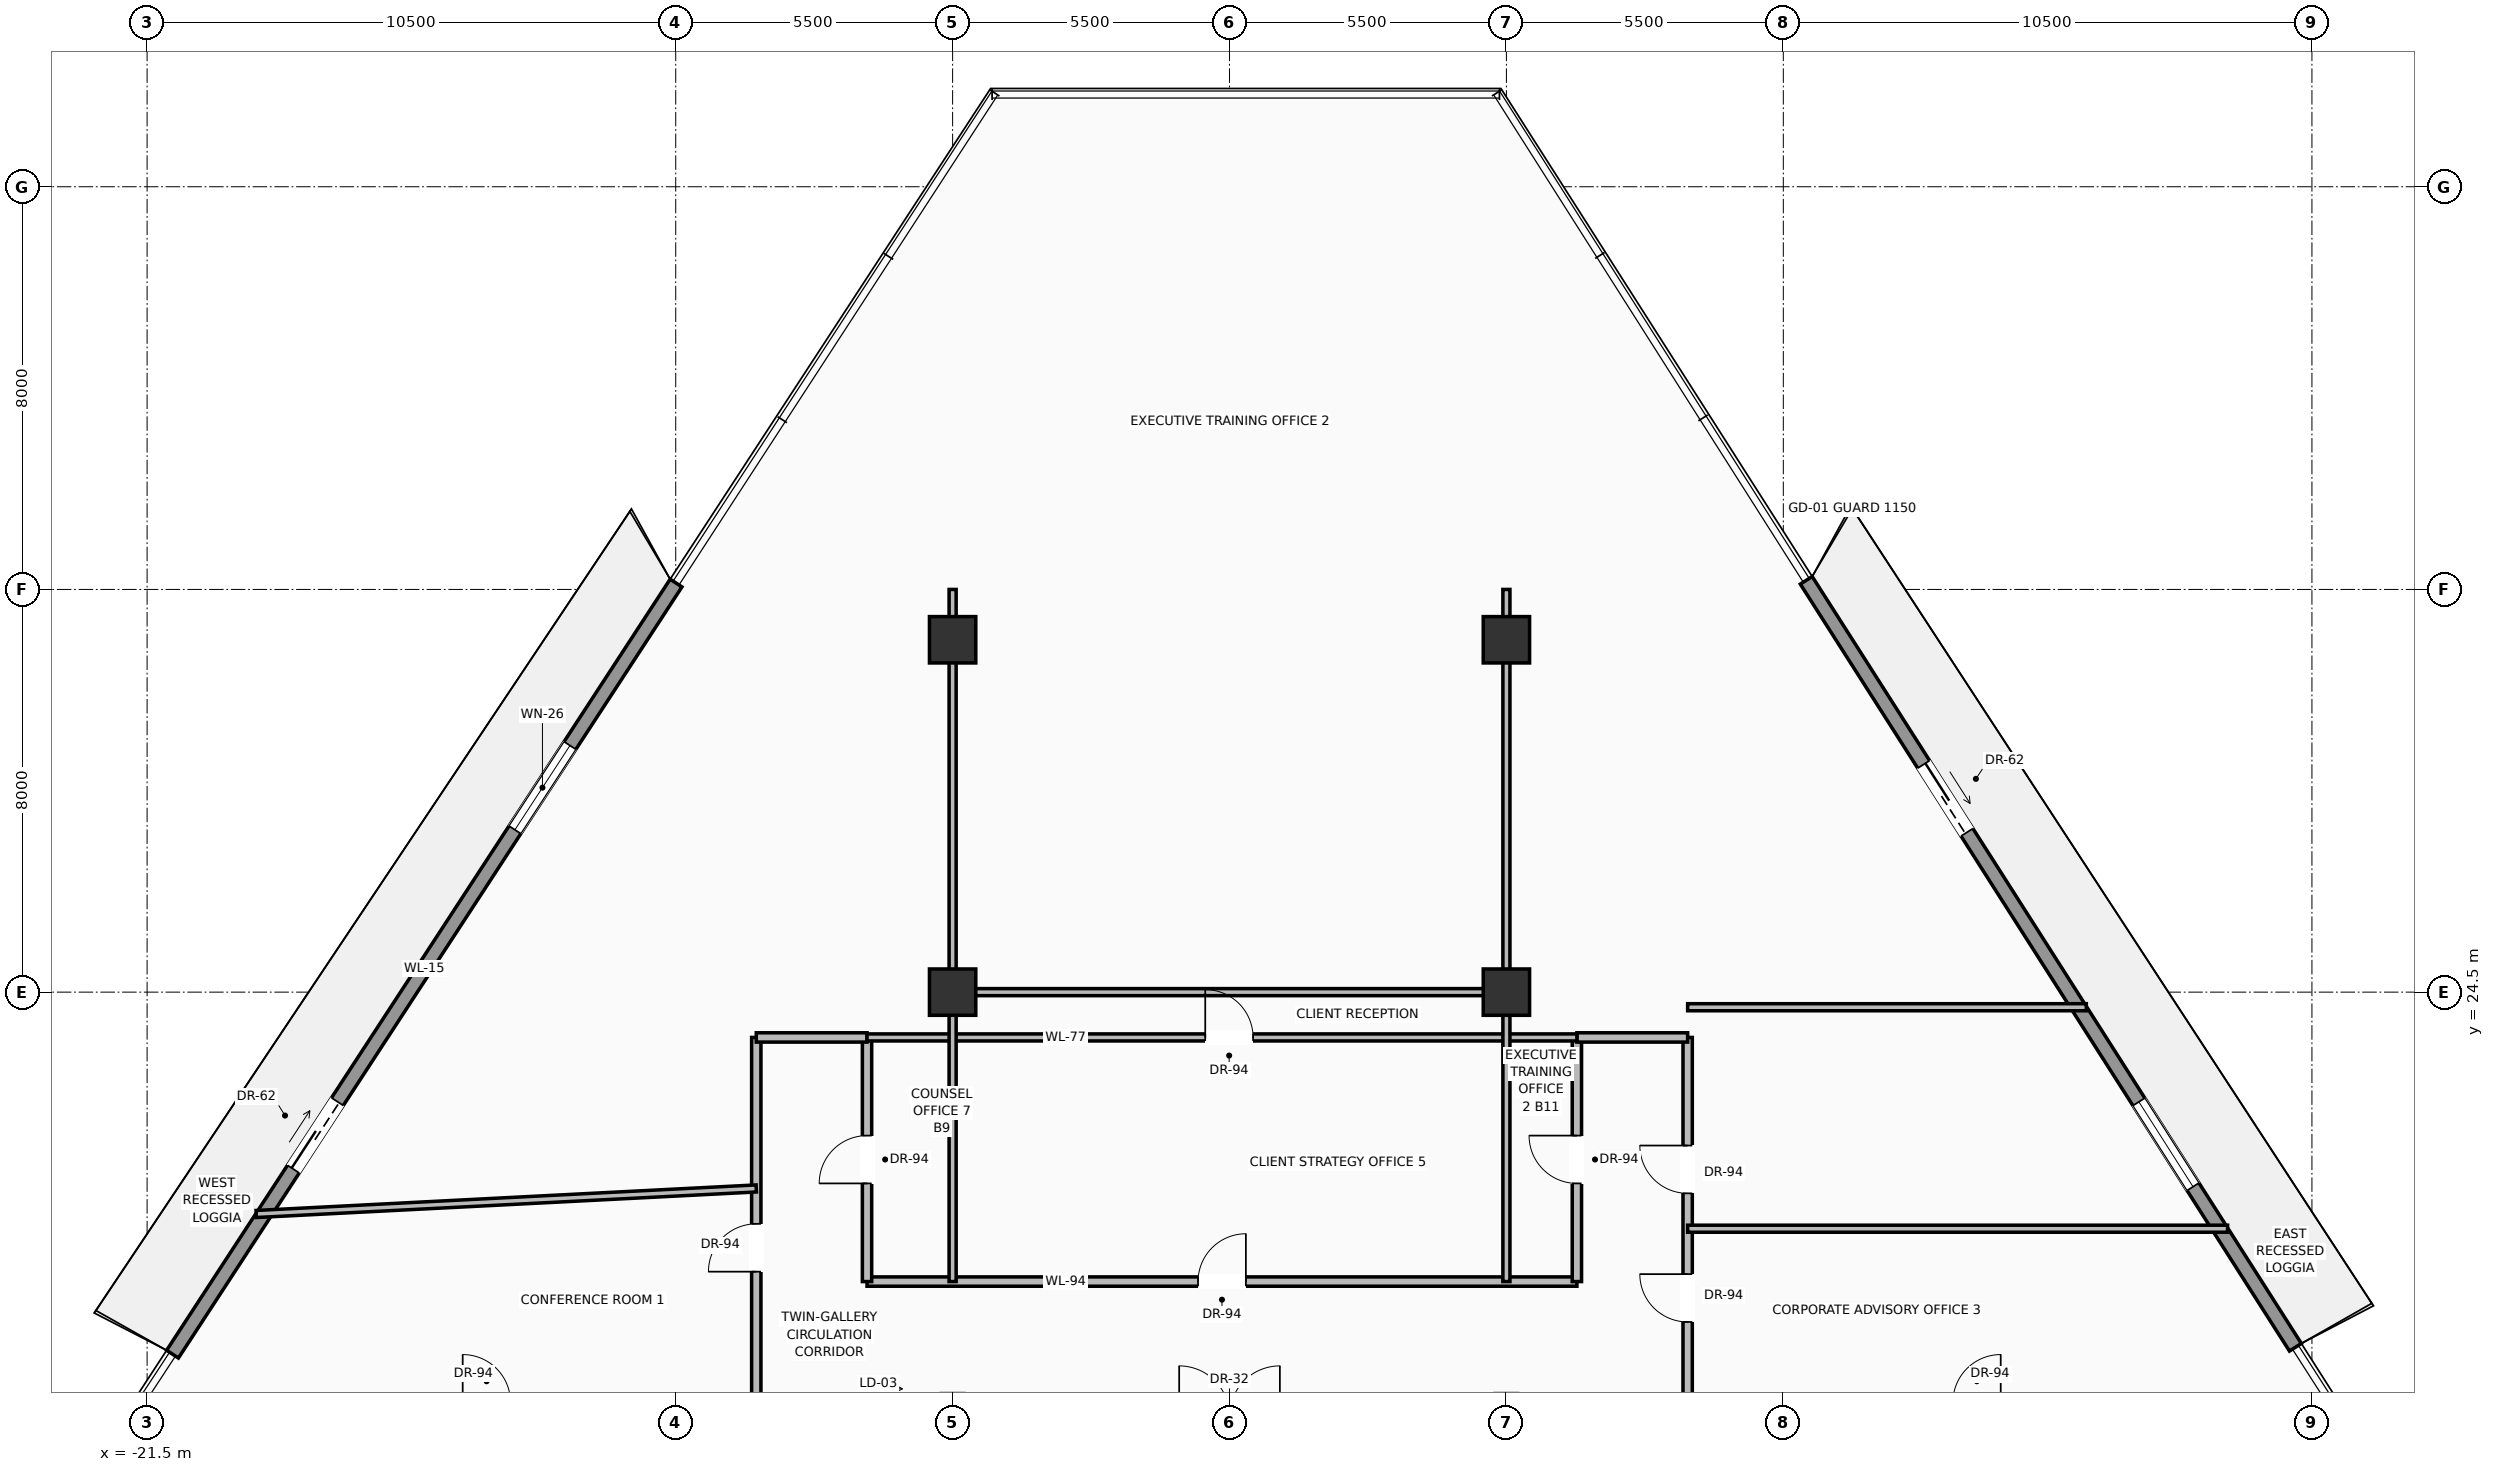
"""IFC4 building model, lengths in metres.
Left out: names, types, materials, properties, quantities, classifications, styles, units other than length and angle.
Written with IfcOpenShell. Run it as: python <this file> out.ifc"""

import sys

from ifc_helpers import new_model, si_unit, direction, frame, frame_2d, origin, origin_2d, place, context, subcontext, project, spatial, rectangle, extrude, source, transform, mapped, element, fill, save


model = new_model("IFC4")
c1 = context("Model", 3, precision=1e-05, world=origin(), true_north=direction((0.0, 1.0)))
c2 = subcontext(c1, "Body", "Model", "MODEL_VIEW")
j1 = project(units=[si_unit("LENGTHUNIT", "METRE"), si_unit("PLANEANGLEUNIT", "RADIAN")], contexts=[c1])
p1 = place(None, origin())
s1 = spatial("IfcSite", under=j1, at=p1, CompositionType="ELEMENT")
p2 = place(p1, origin())
s2 = spatial("IfcBuilding", under=s1, at=p2, CompositionType="ELEMENT")
p3 = place(p2, frame((0.0, 0.0, 136.7)))
s3 = spatial("IfcBuildingStorey", under=s2, at=p3, CompositionType="ELEMENT", Elevation=136.7)
m1 = source(origin(), c2, "Body", "SweptSolid", [
    extrude(rectangle(XDim=0.92, YDim=0.92, at=origin_2d()), origin(), (0.0, 0.0, 1.0), 3.7),
])
for number, where, z_axis, x_axis in (
    (1, (-5.5, 24.5, 0.0), (0.0, 0.0, 1.0), (1.0, 0.0, 0.0)),
    (2, (5.5, 24.5, 0.0), (0.0, 0.0, 1.0), (1.0, 0.0, 0.0)),
    (3, (-5.5, 31.5, 0.0), (0.0, 0.0, 1.0), (1.0, 0.0, 0.0)),
    (4, (5.5, 31.5, 0.0), (0.0, 0.0, 1.0), (1.0, 0.0, 0.0)),
):
    element("IfcColumn", number, at=place(p3, frame(where, z_axis=z_axis, x_axis=x_axis)), inside=s3, PredefinedType="COLUMN", context=c2, shape_type="MappedRepresentation", body=[
        mapped(m1, transform((0.0, 0.0, 0.0), scale=1.0)),
    ])
p4 = place(p3, frame((-20.995, 17.308, 0.0), z_axis=(0.0, 0.0, 1.0), x_axis=(0.546683321298, 0.837339445037, 0.0)))
e5 = element("IfcWall", 5, at=p4, inside=s3, PredefinedType="SOLIDWALL", context=c2, shape_type="SweptSolid", body=[
    extrude(rectangle(XDim=18.295, YDim=0.28, at=frame_2d((9.147, 0.0))), origin(), (0.0, 0.0, 1.0), 3.05),
])
p5 = place(p4, frame((4.391, 0.0, 0.0)))
e6 = element("IfcOpeningElement", 6, at=p5, cuts=e5, PredefinedType="OPENING", context=c2, shape_type="SweptSolid", body=[
    extrude(rectangle(XDim=1.6, YDim=2.35, at=frame_2d((0.8, 1.175))), frame((0.0, 0.15, 0.0), z_axis=(0.0, -1.0, 0.0), x_axis=(1.0, 0.0, 0.0)), (0.0, 0.0, 1.0), 0.3),
])
p6 = place(p4, frame((12.441, 0.0, 0.9)))
e7 = element("IfcOpeningElement", 7, at=p6, cuts=e5, PredefinedType="OPENING", context=c2, shape_type="SweptSolid", body=[
    extrude(rectangle(XDim=2.0, YDim=1.85, at=frame_2d((1.0, 0.925))), frame((0.0, 0.15, 0.0), z_axis=(0.0, -1.0, 0.0), x_axis=(1.0, 0.0, 0.0)), (0.0, 0.0, 1.0), 0.3),
])
p7 = place(p3, frame((11.456, 32.681, 0.0), z_axis=(0.0, 0.0, 1.0), x_axis=(0.537658563867, -0.843162658507, 0.0)))
e8 = element("IfcWall", 8, at=p7, inside=s3, PredefinedType="SOLIDWALL", context=c2, shape_type="SweptSolid", body=[
    extrude(rectangle(XDim=18.07, YDim=0.28, at=frame_2d((9.035, 0.0))), origin(), (0.0, 0.0, 1.0), 3.05),
])
p8 = place(p7, frame((4.337, 0.0, 0.0)))
e9 = element("IfcOpeningElement", 9, at=p8, cuts=e8, PredefinedType="OPENING", context=c2, shape_type="SweptSolid", body=[
    extrude(rectangle(XDim=1.6, YDim=2.35, at=frame_2d((0.8, 1.175))), frame((0.0, 0.15, 0.0), z_axis=(0.0, -1.0, 0.0), x_axis=(1.0, 0.0, 0.0)), (0.0, 0.0, 1.0), 0.3),
])
p9 = place(p7, frame((12.288, 0.0, 0.9)))
e10 = element("IfcOpeningElement", 10, at=p9, cuts=e8, PredefinedType="OPENING", context=c2, shape_type="SweptSolid", body=[
    extrude(rectangle(XDim=2.0, YDim=1.85, at=frame_2d((1.0, 0.925))), frame((0.0, 0.15, 0.0), z_axis=(0.0, -1.0, 0.0), x_axis=(1.0, 0.0, 0.0)), (0.0, 0.0, 1.0), 0.3),
])
p10 = place(p3, frame((-7.2, 18.75, 0.0), z_axis=(0.0, 0.0, 1.0), x_axis=(1.0, 0.0, 0.0)))
e11 = element("IfcWall", 11, at=p10, inside=s3, PredefinedType="PARTITIONING", context=c2, shape_type="SweptSolid", body=[
    extrude(rectangle(XDim=14.1, YDim=0.185, at=frame_2d((7.05, 0.0))), origin(), (0.0, 0.0, 1.0), 2.846),
])
p11 = place(p10, frame((6.575, 0.0, 0.0)))
e12 = element("IfcOpeningElement", 12, at=p11, cuts=e11, PredefinedType="OPENING", context=c2, shape_type="SweptSolid", body=[
    extrude(rectangle(XDim=0.95, YDim=2.2, at=frame_2d((0.475, 1.1))), frame((0.0, 0.103, 0.0), z_axis=(0.0, -1.0, 0.0), x_axis=(1.0, 0.0, 0.0)), (0.0, 0.0, 1.0), 0.205),
])
p12 = place(p3, frame((-7.2, 18.75, 0.0), z_axis=(0.0, 0.0, 1.0), x_axis=(0.0, 1.0, 0.0)))
e13 = element("IfcWall", 13, at=p12, inside=s3, PredefinedType="PARTITIONING", context=c2, shape_type="SweptSolid", body=[
    extrude(rectangle(XDim=4.85, YDim=0.185, at=frame_2d((2.425, 0.0))), origin(), (0.0, 0.0, 1.0), 3.462),
])
p13 = place(p12, frame((1.95, 0.0, 0.0)))
e14 = element("IfcOpeningElement", 14, at=p13, cuts=e13, PredefinedType="OPENING", context=c2, shape_type="SweptSolid", body=[
    extrude(rectangle(XDim=0.95, YDim=2.2, at=frame_2d((0.475, 1.1))), frame((0.0, 0.103, 0.0), z_axis=(0.0, -1.0, 0.0), x_axis=(1.0, 0.0, 0.0)), (0.0, 0.0, 1.0), 0.205),
])
p14 = place(p3, frame((6.9, 18.75, 0.0), z_axis=(0.0, 0.0, 1.0), x_axis=(0.0, 1.0, 0.0)))
e15 = element("IfcWall", 15, at=p14, inside=s3, PredefinedType="PARTITIONING", context=c2, shape_type="SweptSolid", body=[
    extrude(rectangle(XDim=4.85, YDim=0.185, at=frame_2d((2.425, 0.0))), origin(), (0.0, 0.0, 1.0), 3.462),
])
p15 = place(p14, frame((1.95, 0.0, 0.0)))
e16 = element("IfcOpeningElement", 16, at=p15, cuts=e15, PredefinedType="OPENING", context=c2, shape_type="SweptSolid", body=[
    extrude(rectangle(XDim=0.95, YDim=2.2, at=frame_2d((0.475, 1.1))), frame((0.0, 0.103, 0.0), z_axis=(0.0, -1.0, 0.0), x_axis=(1.0, 0.0, 0.0)), (0.0, 0.0, 1.0), 0.205),
])
p16 = place(p3, frame((-9.4, 16.4, 0.0), z_axis=(0.0, 0.0, 1.0), x_axis=(0.0, 1.0, 0.0)))
e17 = element("IfcWall", 17, at=p16, inside=s3, PredefinedType="PARTITIONING", context=c2, shape_type="SweptSolid", body=[
    extrude(rectangle(XDim=7.2, YDim=0.185, at=frame_2d((3.6, 0.0))), origin(), (0.0, 0.0, 1.0), 3.462),
])
p17 = place(p16, frame((2.547, 0.0, 0.0)))
e18 = element("IfcOpeningElement", 18, at=p17, cuts=e17, PredefinedType="OPENING", context=c2, shape_type="SweptSolid", body=[
    extrude(rectangle(XDim=0.95, YDim=2.2, at=frame_2d((0.475, 1.1))), frame((0.0, 0.103, 0.0), z_axis=(0.0, -1.0, 0.0), x_axis=(1.0, 0.0, 0.0)), (0.0, 0.0, 1.0), 0.205),
])
p18 = place(p3, frame((9.1, 16.4, 0.0), z_axis=(0.0, 0.0, 1.0), x_axis=(0.0, 1.0, 0.0)))
e19 = element("IfcWall", 19, at=p18, inside=s3, PredefinedType="PARTITIONING", context=c2, shape_type="SweptSolid", body=[
    extrude(rectangle(XDim=7.2, YDim=0.185, at=frame_2d((3.6, 0.0))), origin(), (0.0, 0.0, 1.0), 3.462),
])
p19 = place(p18, frame((4.103, 0.0, 0.0)))
e20 = element("IfcOpeningElement", 20, at=p19, cuts=e19, PredefinedType="OPENING", context=c2, shape_type="SweptSolid", body=[
    extrude(rectangle(XDim=0.95, YDim=2.2, at=frame_2d((0.475, 1.1))), frame((0.0, 0.103, 0.0), z_axis=(0.0, -1.0, 0.0), x_axis=(1.0, 0.0, 0.0)), (0.0, 0.0, 1.0), 0.205),
])
p20 = place(p18, frame((1.548, 0.0, 0.0)))
e21 = element("IfcOpeningElement", 21, at=p20, cuts=e19, PredefinedType="OPENING", context=c2, shape_type="SweptSolid", body=[
    extrude(rectangle(XDim=0.95, YDim=2.2, at=frame_2d((0.475, 1.1))), frame((0.0, 0.103, 0.0), z_axis=(0.0, -1.0, 0.0), x_axis=(1.0, 0.0, 0.0)), (0.0, 0.0, 1.0), 0.205),
])
p21 = place(p3, frame((-9.4, 23.6, 0.0), z_axis=(0.0, 0.0, 1.0), x_axis=(1.0, 0.0, 0.0)))
e22 = element("IfcWall", 22, at=p21, inside=s3, PredefinedType="PARTITIONING", context=c2, shape_type="SweptSolid", body=[
    extrude(rectangle(XDim=2.2, YDim=0.185, at=frame_2d((1.1, 0.0))), origin(), (0.0, 0.0, 1.0), 3.462),
])
p22 = place(p3, frame((6.9, 23.6, 0.0), z_axis=(0.0, 0.0, 1.0), x_axis=(1.0, 0.0, 0.0)))
e23 = element("IfcWall", 23, at=p22, inside=s3, PredefinedType="PARTITIONING", context=c2, shape_type="SweptSolid", body=[
    extrude(rectangle(XDim=2.2, YDim=0.185, at=frame_2d((1.1, 0.0))), origin(), (0.0, 0.0, 1.0), 3.462),
])
p23 = place(p3, frame((-7.2, 23.6, 0.0), z_axis=(0.0, 0.0, 1.0), x_axis=(1.0, 0.0, 0.0)))
e24 = element("IfcWall", 24, at=p23, inside=s3, PredefinedType="PARTITIONING", context=c2, shape_type="SweptSolid", body=[
    extrude(rectangle(XDim=14.1, YDim=0.14, at=frame_2d((7.05, 0.0))), origin(), (0.0, 0.0, 1.0), 3.462),
])
p24 = place(p23, frame((6.718, 0.0, 0.0)))
e25 = element("IfcOpeningElement", 25, at=p24, cuts=e24, PredefinedType="OPENING", context=c2, shape_type="SweptSolid", body=[
    extrude(rectangle(XDim=0.95, YDim=2.2, at=frame_2d((0.475, 1.1))), frame((0.0, 0.08, 0.0), z_axis=(0.0, -1.0, 0.0), x_axis=(1.0, 0.0, 0.0)), (0.0, 0.0, 1.0), 0.16),
])
for number, where, z_axis, x_axis in (
    (26, (-5.5, 18.75, 0.0), (0.0, 0.0, 1.0), (0.0, 1.0, 0.0)),
    (27, (5.5, 18.75, 0.0), (0.0, 0.0, 1.0), (0.0, 1.0, 0.0)),
):
    element("IfcWall", number, at=place(p3, frame(where, z_axis=z_axis, x_axis=x_axis)), inside=s3, PredefinedType="PARTITIONING", context=c2, shape_type="SweptSolid", body=[
        extrude(rectangle(XDim=13.75, YDim=0.14, at=frame_2d((6.875, 0.0))), origin(), (0.0, 0.0, 1.0), 2.846),
    ])
p25 = place(p3, frame((-5.5, 24.5, 0.0), z_axis=(0.0, 0.0, 1.0), x_axis=(1.0, 0.0, 0.0)))
e28 = element("IfcWall", 28, at=p25, inside=s3, PredefinedType="PARTITIONING", context=c2, shape_type="SweptSolid", body=[
    extrude(rectangle(XDim=11.0, YDim=0.14, at=frame_2d((5.5, 0.0))), origin(), (0.0, 0.0, 1.0), 2.846),
])
p26 = place(p3, frame((-19.332, 20.092, 0.0), z_axis=(0.0, 0.0, 1.0), x_axis=(0.998695571357, 0.051060314835, 0.0)))
e29 = element("IfcWall", 29, at=p26, inside=s3, PredefinedType="PARTITIONING", context=c2, shape_type="SweptSolid", body=[
    extrude(rectangle(XDim=9.945, YDim=0.14, at=frame_2d((4.973, 0.0))), origin(), (0.0, 0.0, 1.0), 3.462),
])
p27 = place(p3, frame((9.1, 19.8, 0.0), z_axis=(0.0, 0.0, 1.0), x_axis=(1.0, 0.0, 0.0)))
e30 = element("IfcWall", 30, at=p27, inside=s3, PredefinedType="PARTITIONING", context=c2, shape_type="SweptSolid", body=[
    extrude(rectangle(XDim=10.724, YDim=0.14, at=frame_2d((5.362, 0.0))), origin(), (0.0, 0.0, 1.0), 3.462),
])
p28 = place(p3, frame((9.1, 24.2, 0.0), z_axis=(0.0, 0.0, 1.0), x_axis=(1.0, 0.0, 0.0)))
e31 = element("IfcWall", 31, at=p28, inside=s3, PredefinedType="PARTITIONING", context=c2, shape_type="SweptSolid", body=[
    extrude(rectangle(XDim=7.918, YDim=0.14, at=frame_2d((3.959, 0.0))), origin(), (0.0, 0.0, 1.0), 3.462),
])
m2 = source(origin(), c2, "Body", "SweptSolid", [
    extrude(rectangle(XDim=1.6, YDim=2.35, at=frame_2d((0.8, 1.175))), frame((0.0, 0.025, 0.0), z_axis=(0.0, -1.0, 0.0), x_axis=(1.0, 0.0, 0.0)), (0.0, 0.0, 1.0), 0.05),
])
p29 = place(p5, origin())
e32 = element("IfcDoor", 32, at=p29, inside=s3, OperationType="SLIDING_TO_LEFT", PredefinedType="DOOR", context=c2, shape_type="MappedRepresentation", body=[
    mapped(m2, transform((0.0, 0.0, 0.0), scale=1.0)),
])
fill(e6, e32)
m3 = source(origin(), c2, "Body", "SweptSolid", [
    extrude(rectangle(XDim=2.0, YDim=1.85, at=frame_2d((1.0, 0.925))), frame((0.0, 0.03, 0.0), z_axis=(0.0, -1.0, 0.0), x_axis=(1.0, 0.0, 0.0)), (0.0, 0.0, 1.0), 0.06),
])
p30 = place(p6, origin())
e33 = element("IfcWindow", 33, at=p30, inside=s3, PartitioningType="SINGLE_PANEL", PredefinedType="WINDOW", context=c2, shape_type="MappedRepresentation", body=[
    mapped(m3, transform((0.0, 0.0, 0.0), scale=1.0)),
])
fill(e7, e33)
p31 = place(p8, origin())
e34 = element("IfcDoor", 34, at=p31, inside=s3, OperationType="SLIDING_TO_RIGHT", PredefinedType="DOOR", context=c2, shape_type="MappedRepresentation", body=[
    mapped(m2, transform((0.0, 0.0, 0.0), scale=1.0)),
])
fill(e9, e34)
p32 = place(p9, origin())
e35 = element("IfcWindow", 35, at=p32, inside=s3, PartitioningType="SINGLE_PANEL", PredefinedType="WINDOW", context=c2, shape_type="MappedRepresentation", body=[
    mapped(m3, transform((0.0, 0.0, 0.0), scale=1.0)),
])
fill(e10, e35)
m4 = source(origin(), c2, "Body", "SweptSolid", [
    extrude(rectangle(XDim=0.95, YDim=2.2, at=frame_2d((0.475, 1.1))), frame((0.0, 0.025, 0.0), z_axis=(0.0, -1.0, 0.0), x_axis=(1.0, 0.0, 0.0)), (0.0, 0.0, 1.0), 0.05),
])
p33 = place(p11, origin())
e36 = element("IfcDoor", 36, at=p33, inside=s3, OperationType="SINGLE_SWING_RIGHT", PredefinedType="DOOR", context=c2, shape_type="MappedRepresentation", body=[
    mapped(m4, transform((0.0, 0.0, 0.0), scale=1.0)),
])
fill(e12, e36)
p34 = place(p17, origin())
e37 = element("IfcDoor", 37, at=p34, inside=s3, OperationType="SINGLE_SWING_LEFT", PredefinedType="DOOR", context=c2, shape_type="MappedRepresentation", body=[
    mapped(m4, transform((0.0, 0.0, 0.0), scale=1.0)),
])
fill(e18, e37)
p35 = place(p19, origin())
e38 = element("IfcDoor", 38, at=p35, inside=s3, OperationType="SINGLE_SWING_RIGHT", PredefinedType="DOOR", context=c2, shape_type="MappedRepresentation", body=[
    mapped(m4, transform((0.0, 0.0, 0.0), scale=1.0)),
])
fill(e20, e38)
p36 = place(p20, origin())
e39 = element("IfcDoor", 39, at=p36, inside=s3, OperationType="SINGLE_SWING_RIGHT", PredefinedType="DOOR", context=c2, shape_type="MappedRepresentation", body=[
    mapped(m4, transform((0.0, 0.0, 0.0), scale=1.0)),
])
fill(e21, e39)
p37 = place(p13, origin())
e40 = element("IfcDoor", 40, at=p37, inside=s3, OperationType="SINGLE_SWING_LEFT", PredefinedType="DOOR", context=c2, shape_type="MappedRepresentation", body=[
    mapped(m4, transform((0.0, 0.0, 0.0), scale=1.0)),
])
fill(e14, e40)
p38 = place(p15, origin())
e41 = element("IfcDoor", 41, at=p38, inside=s3, OperationType="SINGLE_SWING_RIGHT", PredefinedType="DOOR", context=c2, shape_type="MappedRepresentation", body=[
    mapped(m4, transform((0.0, 0.0, 0.0), scale=1.0)),
])
fill(e16, e41)
p39 = place(p24, origin())
e42 = element("IfcDoor", 42, at=p39, inside=s3, OperationType="SINGLE_SWING_LEFT", PredefinedType="DOOR", context=c2, shape_type="MappedRepresentation", body=[
    mapped(m4, transform((0.0, 0.0, 0.0), scale=1.0)),
])
fill(e25, e42)
save(model, sys.argv[1])
